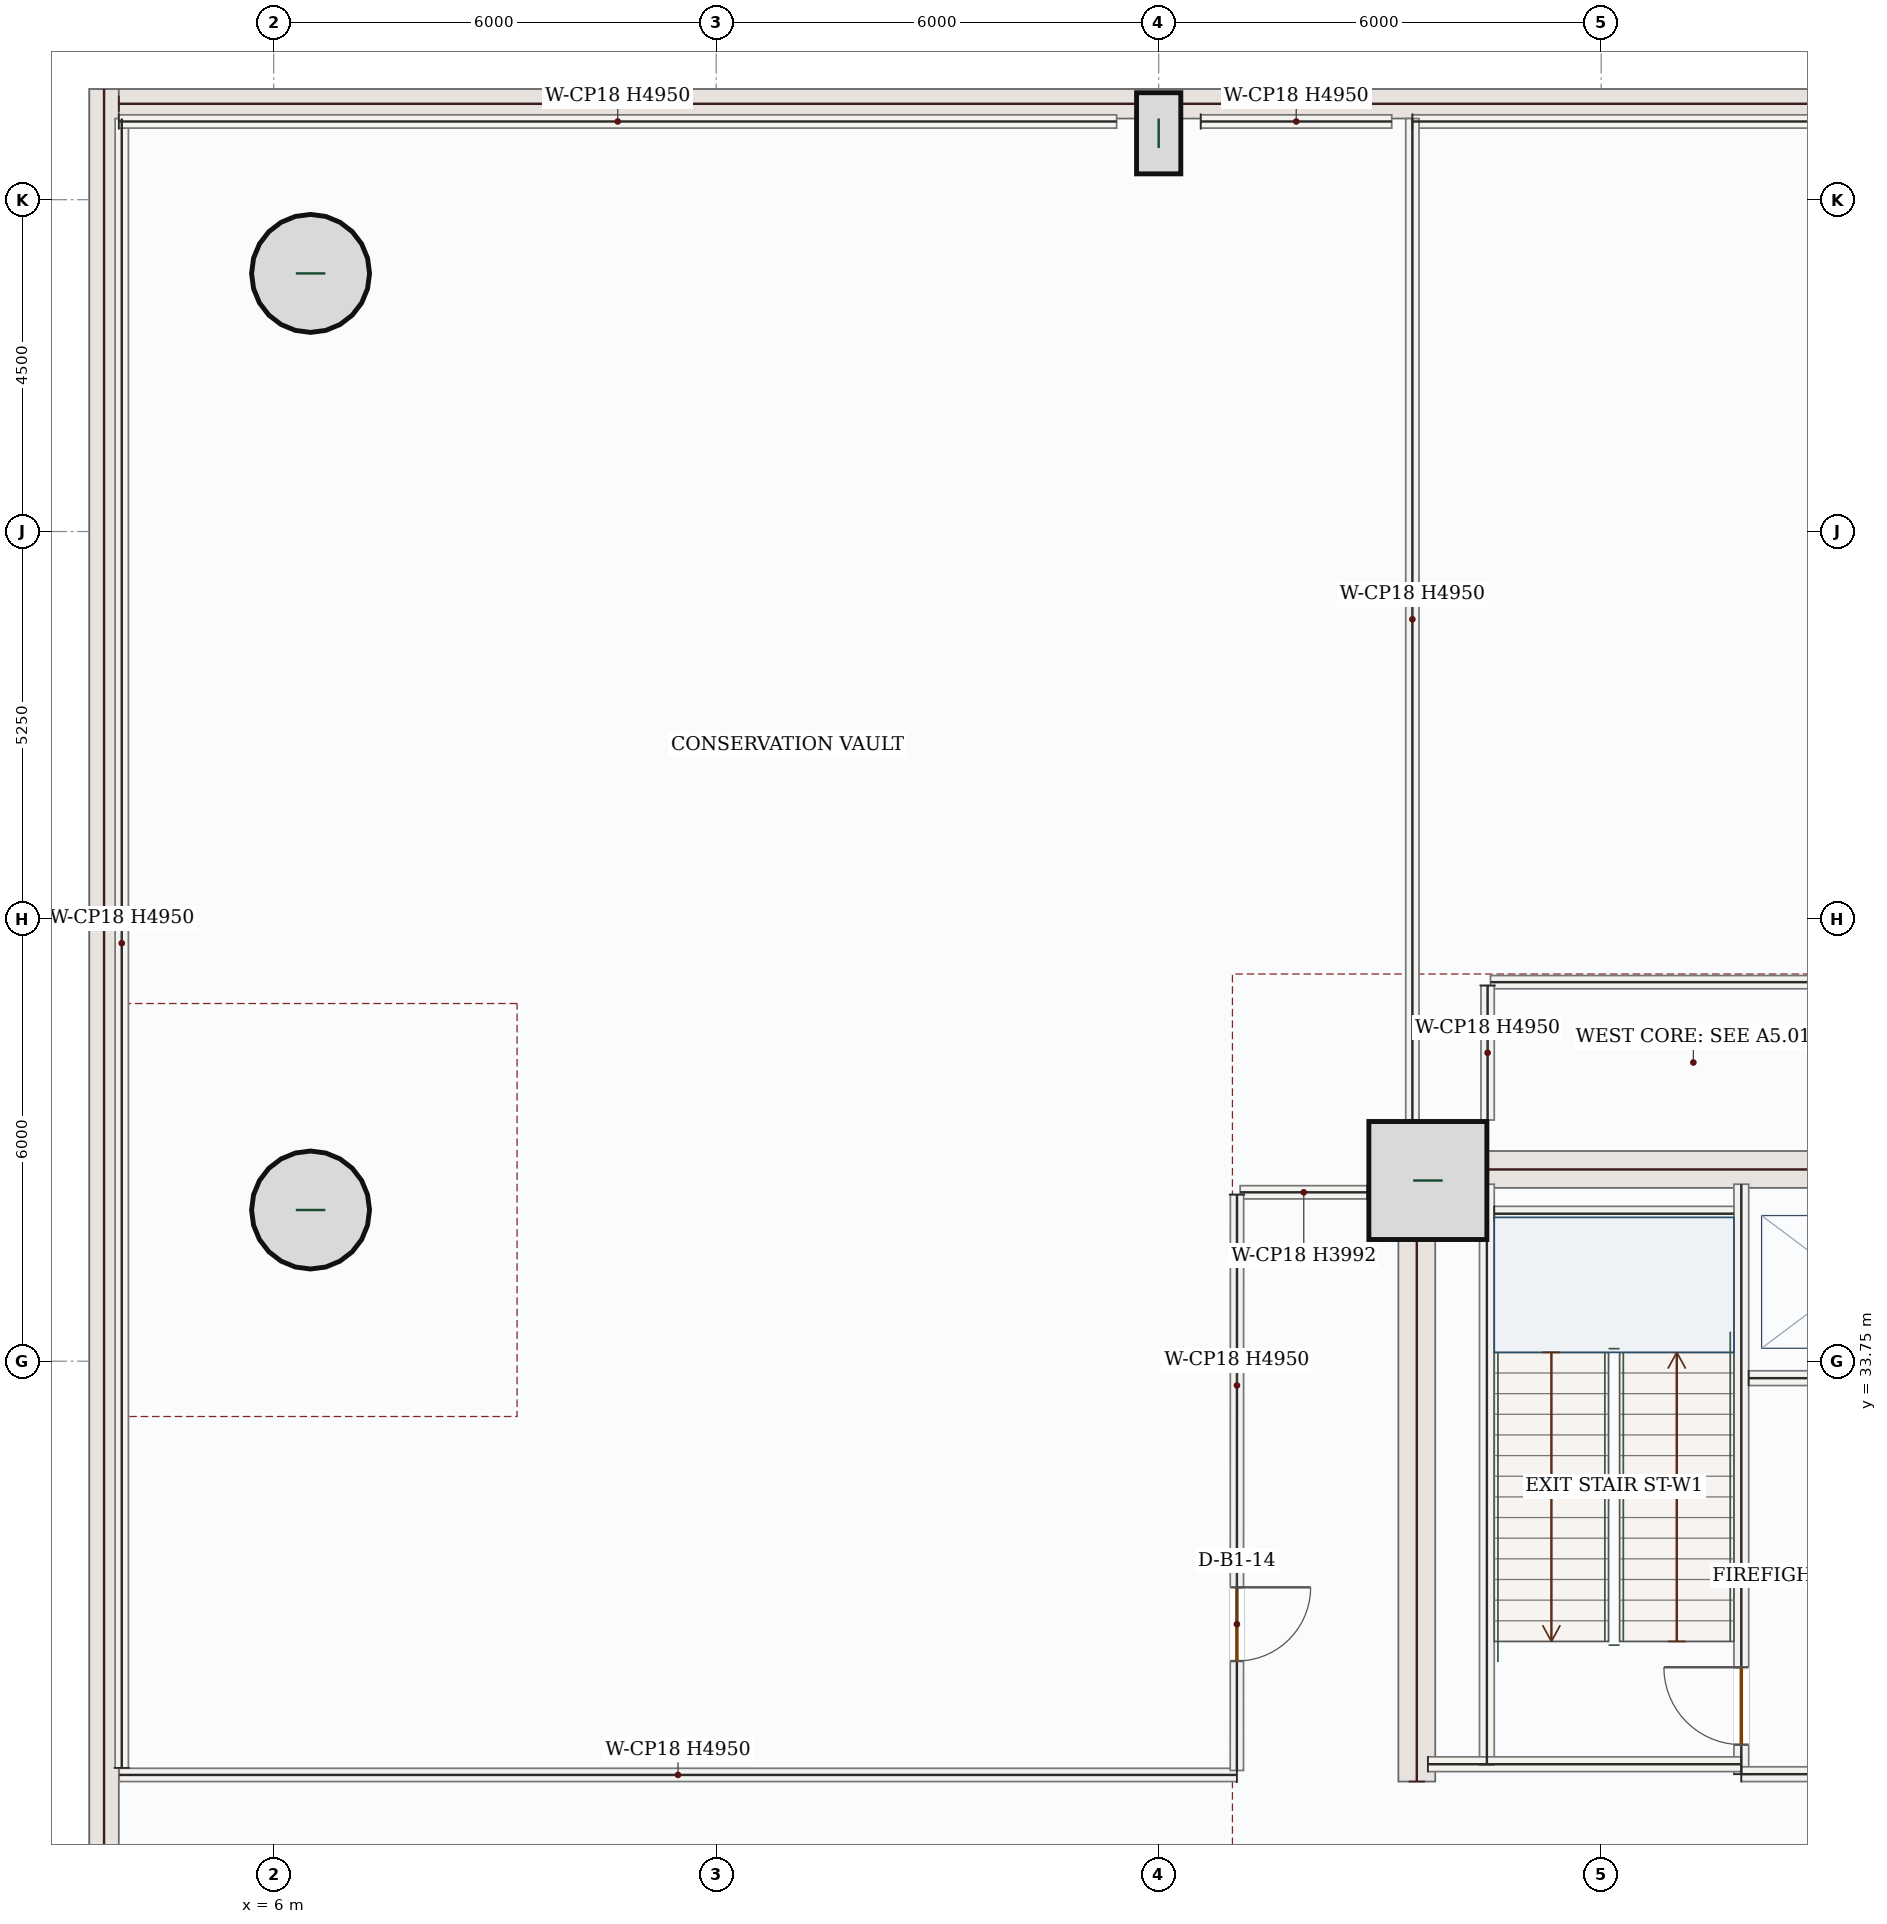
"""IFC4 building model, lengths in metres.
Left out: names, types, materials, properties, quantities, classifications, styles, units other than length and angle.
Written with IfcOpenShell. Run it as: python <this file> out.ifc"""

import sys

from ifc_helpers import new_model, si_unit, direction, frame, frame_2d, origin, origin_2d, place, context, subcontext, project, spatial, rectangle, hollow_circle, extrude, source, transform, mapped, element, fill, save


model = new_model("IFC4")
c1 = context("Model", 3, precision=1e-05, world=origin(), true_north=direction((0.0, 1.0)))
c2 = subcontext(c1, "Body", "Model", "MODEL_VIEW")
j1 = project(units=[si_unit("LENGTHUNIT", "METRE"), si_unit("PLANEANGLEUNIT", "RADIAN")], contexts=[c1])
p1 = place(None, origin())
s1 = spatial("IfcSite", under=j1, at=p1, CompositionType="ELEMENT")
p2 = place(p1, origin())
s2 = spatial("IfcBuilding", under=s1, at=p2, CompositionType="ELEMENT")
p3 = place(p2, frame((0.0, 0.0, -5.4)))
s3 = spatial("IfcBuildingStorey", under=s2, at=p3, CompositionType="ELEMENT", Elevation=-5.4)
m1 = source(origin(), c2, "Body", "SweptSolid", [
    extrude(rectangle(XDim=48.0, YDim=0.4, at=frame_2d((24.0, 0.0))), origin(), (0.0, 0.0, 1.0), 5.05),
])
p4 = place(p3, frame((3.7, 3.0, 0.0), z_axis=(0.0, 0.0, 1.0), x_axis=(0.0, 1.0, 0.0)))
e1 = element("IfcWall", 1, at=p4, inside=s3, PredefinedType="SHEAR", context=c2, shape_type="MappedRepresentation", body=[
    mapped(m1, transform((0.0, 0.0, 0.0), x_axis=(1.0, 0.0, 0.0), y_axis=(0.0, 1.0, 0.0), z_axis=(0.0, 0.0, 1.0), scale=1.0)),
])
m2 = source(origin(), c2, "Body", "SweptSolid", [
    extrude(rectangle(XDim=64.2, YDim=0.4, at=frame_2d((32.1, 0.0))), origin(), (0.0, 0.0, 1.0), 5.05),
])
p5 = place(p3, frame((3.9, 50.8, 0.0), z_axis=(0.0, 0.0, 1.0), x_axis=(1.0, 0.0, 0.0)))
e2 = element("IfcWall", 2, at=p5, inside=s3, PredefinedType="SHEAR", context=c2, shape_type="MappedRepresentation", body=[
    mapped(m2, transform((0.0, 0.0, 0.0), x_axis=(1.0, 0.0, 0.0), y_axis=(0.0, 1.0, 0.0), z_axis=(0.0, 0.0, 1.0), scale=1.0)),
])
m3 = source(origin(), c2, "Body", "SweptSolid", [
    extrude(rectangle(XDim=8.55, YDim=0.5, at=frame_2d((4.275, 0.0))), origin(), (0.0, 0.0, 1.0), 4.95),
])
p6 = place(p3, frame((21.5, 28.05, 0.0), z_axis=(0.0, 0.0, 1.0), x_axis=(0.0, 1.0, 0.0)))
e3 = element("IfcWall", 3, at=p6, inside=s3, PredefinedType="SHEAR", context=c2, shape_type="MappedRepresentation", body=[
    mapped(m3, transform((0.0, 0.0, 0.0), x_axis=(1.0, 0.0, 0.0), y_axis=(0.0, 1.0, 0.0), z_axis=(0.0, 0.0, 1.0), scale=1.0)),
])
m4 = source(origin(), c2, "Body", "SweptSolid", [
    extrude(rectangle(XDim=7.0, YDim=0.5, at=frame_2d((3.5, 0.0))), origin(), (0.0, 0.0, 1.0), 4.95),
])
p7 = place(p3, frame((21.75, 36.35, 0.0), z_axis=(0.0, 0.0, 1.0), x_axis=(1.0, 0.0, 0.0)))
e4 = element("IfcWall", 4, at=p7, inside=s3, PredefinedType="SHEAR", context=c2, shape_type="MappedRepresentation", body=[
    mapped(m4, transform((0.0, 0.0, 0.0), x_axis=(1.0, 0.0, 0.0), y_axis=(0.0, 1.0, 0.0), z_axis=(0.0, 0.0, 1.0), scale=1.0)),
])
m5 = source(origin(), c2, "Body", "SweptSolid", [
    extrude(rectangle(XDim=1.6, YDim=1.6, at=origin_2d()), origin(), (0.0, 0.0, 1.0), 5.4),
])
p8 = place(p3, frame((21.65, 36.2, 0.0), z_axis=(0.0, 0.0, 1.0), x_axis=(1.0, 0.0, 0.0)))
e5 = element("IfcColumn", 5, at=p8, inside=s3, PredefinedType="COLUMN", context=c2, shape_type="MappedRepresentation", body=[
    mapped(m5, transform((0.0, 0.0, 0.0), x_axis=(1.0, 0.0, 0.0), y_axis=(0.0, 1.0, 0.0), z_axis=(0.0, 0.0, 1.0), scale=1.0)),
])
m6 = source(origin(), c2, "Body", "SweptSolid", [
    extrude(hollow_circle(Radius=0.8, WallThickness=0.06, at=origin_2d()), origin(), (0.0, 0.0, 1.0), 5.4),
])
for number, where, z_axis, x_axis in (
    (6, (6.5, 35.8, 0.0), (0.0, 0.0, 1.0), (1.0, 0.0, 0.0)),
    (7, (6.5, 48.5, 0.0), (0.0, 0.0, 1.0), (1.0, 0.0, 0.0)),
):
    element("IfcColumn", number, at=place(p3, frame(where, z_axis=z_axis, x_axis=x_axis)), inside=s3, PredefinedType="COLUMN", context=c2, shape_type="MappedRepresentation", body=[
        mapped(m6, transform((0.0, 0.0, 0.0), x_axis=(1.0, 0.0, 0.0), y_axis=(0.0, 1.0, 0.0), z_axis=(0.0, 0.0, 1.0), scale=1.0)),
    ])
m7 = source(origin(), c2, "Body", "SweptSolid", [
    extrude(rectangle(XDim=0.6, YDim=1.1, at=origin_2d()), origin(), (0.0, 0.0, 1.0), 5.4),
])
p9 = place(p3, frame((18.0, 50.4, 0.0), z_axis=(0.0, 0.0, 1.0), x_axis=(1.0, 0.0, 0.0)))
e8 = element("IfcColumn", 8, at=p9, inside=s3, PredefinedType="PILASTER", context=c2, shape_type="MappedRepresentation", body=[
    mapped(m7, transform((0.0, 0.0, 0.0), x_axis=(1.0, 0.0, 0.0), y_axis=(0.0, 1.0, 0.0), z_axis=(0.0, 0.0, 1.0), scale=1.0)),
])
m8 = source(origin(), c2, "Body", "SweptSolid", [
    extrude(rectangle(XDim=7.87, YDim=0.2, at=frame_2d((3.935, 0.0))), origin(), (0.0, 0.0, 1.0), 4.95),
])
p10 = place(p3, frame((22.45, 28.28, 0.0), z_axis=(0.0, 0.0, 1.0), x_axis=(0.0, 1.0, 0.0)))
e9 = element("IfcWall", 9, at=p10, inside=s3, PredefinedType="SOLIDWALL", context=c2, shape_type="MappedRepresentation", body=[
    mapped(m8, transform((0.0, 0.0, 0.0), x_axis=(1.0, 0.0, 0.0), y_axis=(0.0, 1.0, 0.0), z_axis=(0.0, 0.0, 1.0), scale=1.0)),
])
p11 = place(p3, frame((25.9, 28.15, 0.0), z_axis=(0.0, 0.0, 1.0), x_axis=(0.0, 1.0, 0.0)))
e10 = element("IfcWall", 10, at=p11, inside=s3, PredefinedType="SOLIDWALL", context=c2, shape_type="SweptSolid", body=[
    extrude(rectangle(XDim=8.0, YDim=0.2, at=frame_2d((4.0, 0.0))), origin(), (0.0, 0.0, 1.0), 4.95),
])
p12 = place(p11, frame((0.4, 0.0, 0.0)))
e11 = element("IfcOpeningElement", 11, at=p12, cuts=e10, PredefinedType="OPENING", context=c2, shape_type="SweptSolid", body=[
    extrude(rectangle(XDim=1.05, YDim=2.15, at=frame_2d((0.525, 1.075))), frame((0.0, 0.11, 0.0), z_axis=(0.0, -1.0, 0.0), x_axis=(1.0, 0.0, 0.0)), (0.0, 0.0, 1.0), 0.22),
])
m9 = source(origin(), c2, "Body", "SweptSolid", [
    extrude(rectangle(XDim=4.25, YDim=0.2, at=frame_2d((2.125, 0.0))), origin(), (0.0, 0.0, 1.0), 4.95),
])
p13 = place(p3, frame((21.65, 28.285, 0.0), z_axis=(0.0, 0.0, 1.0), x_axis=(1.0, 0.0, 0.0)))
e12 = element("IfcWall", 12, at=p13, inside=s3, PredefinedType="SOLIDWALL", context=c2, shape_type="MappedRepresentation", body=[
    mapped(m9, transform((0.0, 0.0, 0.0), x_axis=(1.0, 0.0, 0.0), y_axis=(0.0, 1.0, 0.0), z_axis=(0.0, 0.0, 1.0), scale=1.0)),
])
m10 = source(origin(), c2, "Body", "SweptSolid", [
    extrude(rectangle(XDim=3.0, YDim=0.2, at=frame_2d((1.5, 0.0))), origin(), (0.0, 0.0, 1.0), 4.95),
])
p14 = place(p3, frame((25.9, 28.15, 0.0), z_axis=(0.0, 0.0, 1.0), x_axis=(1.0, 0.0, 0.0)))
e13 = element("IfcWall", 13, at=p14, inside=s3, PredefinedType="SOLIDWALL", context=c2, shape_type="MappedRepresentation", body=[
    mapped(m10, transform((0.0, 0.0, 0.0), x_axis=(1.0, 0.0, 0.0), y_axis=(0.0, 1.0, 0.0), z_axis=(0.0, 0.0, 1.0), scale=1.0)),
])
m11 = source(origin(), c2, "Body", "SweptSolid", [
    extrude(rectangle(XDim=3.25, YDim=0.2, at=frame_2d((1.625, 0.0))), origin(), (0.0, 0.0, 1.0), 4.95),
])
p15 = place(p3, frame((22.55, 35.75, 0.0), z_axis=(0.0, 0.0, 1.0), x_axis=(1.0, 0.0, 0.0)))
e14 = element("IfcWall", 14, at=p15, inside=s3, PredefinedType="SOLIDWALL", context=c2, shape_type="MappedRepresentation", body=[
    mapped(m11, transform((0.0, 0.0, 0.0), x_axis=(1.0, 0.0, 0.0), y_axis=(0.0, 1.0, 0.0), z_axis=(0.0, 0.0, 1.0), scale=1.0)),
])
p16 = place(p3, frame((26.0, 33.52, 0.0), z_axis=(0.0, 0.0, 1.0), x_axis=(1.0, 0.0, 0.0)))
e15 = element("IfcWall", 15, at=p16, inside=s3, PredefinedType="SOLIDWALL", context=c2, shape_type="SweptSolid", body=[
    extrude(rectangle(XDim=2.75, YDim=0.2, at=frame_2d((1.375, 0.0))), origin(), (0.0, 0.0, 1.0), 4.95),
])
p17 = place(p16, frame((0.82, 0.0, 0.0)))
e16 = element("IfcOpeningElement", 16, at=p17, cuts=e15, PredefinedType="OPENING", context=c2, shape_type="SweptSolid", body=[
    extrude(rectangle(XDim=1.1, YDim=2.15, at=frame_2d((0.55, 1.075))), frame((0.0, 0.11, 0.0), z_axis=(0.0, -1.0, 0.0), x_axis=(1.0, 0.0, 0.0)), (0.0, 0.0, 1.0), 0.22),
])
m12 = source(origin(), c2, "Body", "SweptSolid", [
    extrude(rectangle(XDim=29.12, YDim=0.18, at=frame_2d((14.56, 0.0))), origin(), (0.0, 0.0, 1.0), 4.95),
])
p18 = place(p3, frame((21.44, 50.56, 0.0), z_axis=(0.0, 0.0, 1.0), x_axis=(1.0, 0.0, 0.0)))
e17 = element("IfcWall", 17, at=p18, inside=s3, PredefinedType="PARTITIONING", context=c2, shape_type="MappedRepresentation", body=[
    mapped(m12, transform((0.0, 0.0, 0.0), x_axis=(1.0, 0.0, 0.0), y_axis=(0.0, 1.0, 0.0), z_axis=(0.0, 0.0, 1.0), scale=1.0)),
])
p19 = place(p3, frame((49.494, 38.89, 0.0), z_axis=(0.0, 0.0, 1.0), x_axis=(-0.999999999836, -1.8087762e-05, 0.0)))
e18 = element("IfcWall", 18, at=p19, inside=s3, PredefinedType="PARTITIONING", context=c2, shape_type="SweptSolid", body=[
    extrude(rectangle(XDim=26.995, YDim=0.18, at=frame_2d((13.498, 0.0))), origin(), (0.0, 0.0, 1.0), 4.95),
])
p20 = place(p19, frame((12.998, 0.0, 0.0)))
e19 = element("IfcOpeningElement", 19, at=p20, cuts=e18, PredefinedType="OPENING", context=c2, shape_type="SweptSolid", body=[
    extrude(rectangle(XDim=1.0, YDim=2.15, at=frame_2d((0.5, 1.075))), frame((0.0, 0.1, 0.0), z_axis=(0.0, -1.0, 0.0), x_axis=(1.0, 0.0, 0.0)), (0.0, 0.0, 1.0), 0.2),
])
m13 = source(origin(), c2, "Body", "SweptSolid", [
    extrude(rectangle(XDim=1.824, YDim=0.18, at=frame_2d((0.912, 0.0))), origin(), (0.0, 0.0, 1.0), 4.95),
])
p21 = place(p3, frame((22.46, 38.844, 0.0), z_axis=(0.0, 0.0, 1.0), x_axis=(0.0, -1.0, 0.0)))
e20 = element("IfcWall", 20, at=p21, inside=s3, PredefinedType="PARTITIONING", context=c2, shape_type="MappedRepresentation", body=[
    mapped(m13, transform((0.0, 0.0, 0.0), x_axis=(1.0, 0.0, 0.0), y_axis=(0.0, 1.0, 0.0), z_axis=(0.0, 0.0, 1.0), scale=1.0)),
])
m14 = source(origin(), c2, "Body", "SweptSolid", [
    extrude(rectangle(XDim=13.58, YDim=0.18, at=frame_2d((6.79, 0.0))), origin(), (0.0, 0.0, 1.0), 4.95),
])
p22 = place(p3, frame((21.44, 37.02, 0.0), z_axis=(0.0, 0.0, 1.0), x_axis=(0.0, 1.0, 0.0)))
e21 = element("IfcWall", 21, at=p22, inside=s3, PredefinedType="PARTITIONING", context=c2, shape_type="MappedRepresentation", body=[
    mapped(m14, transform((0.0, 0.0, 0.0), x_axis=(1.0, 0.0, 0.0), y_axis=(0.0, 1.0, 0.0), z_axis=(0.0, 0.0, 1.0), scale=1.0)),
])
m15 = source(origin(), c2, "Body", "SweptSolid", [
    extrude(rectangle(XDim=15.155, YDim=0.18, at=frame_2d((7.578, 0.0))), origin(), (0.0, 0.0, 1.0), 4.95),
])
p23 = place(p3, frame((19.06, 28.14, 0.0), z_axis=(0.0, 0.0, 1.0), x_axis=(-1.0, 0.0, 0.0)))
e22 = element("IfcWall", 22, at=p23, inside=s3, PredefinedType="PARTITIONING", context=c2, shape_type="MappedRepresentation", body=[
    mapped(m15, transform((0.0, 0.0, 0.0), x_axis=(1.0, 0.0, 0.0), y_axis=(0.0, 1.0, 0.0), z_axis=(0.0, 0.0, 1.0), scale=1.0)),
])
m16 = source(origin(), c2, "Body", "SweptSolid", [
    extrude(rectangle(XDim=22.365, YDim=0.18, at=frame_2d((11.183, 0.0))), origin(), (0.0, 0.0, 1.0), 4.95),
])
p24 = place(p3, frame((3.94, 28.235, 0.0), z_axis=(0.0, 0.0, 1.0), x_axis=(0.0, 1.0, 0.0)))
e23 = element("IfcWall", 23, at=p24, inside=s3, PredefinedType="PARTITIONING", context=c2, shape_type="MappedRepresentation", body=[
    mapped(m16, transform((0.0, 0.0, 0.0), x_axis=(1.0, 0.0, 0.0), y_axis=(0.0, 1.0, 0.0), z_axis=(0.0, 0.0, 1.0), scale=1.0)),
])
m17 = source(origin(), c2, "Body", "SweptSolid", [
    extrude(rectangle(XDim=13.53, YDim=0.18, at=frame_2d((6.765, 0.0))), origin(), (0.0, 0.0, 1.0), 4.95),
])
p25 = place(p3, frame((3.9, 50.56, 0.0), z_axis=(0.0, 0.0, 1.0), x_axis=(1.0, 0.0, 0.0)))
e24 = element("IfcWall", 24, at=p25, inside=s3, PredefinedType="PARTITIONING", context=c2, shape_type="MappedRepresentation", body=[
    mapped(m17, transform((0.0, 0.0, 0.0), x_axis=(1.0, 0.0, 0.0), y_axis=(0.0, 1.0, 0.0), z_axis=(0.0, 0.0, 1.0), scale=1.0)),
])
m18 = source(origin(), c2, "Body", "SweptSolid", [
    extrude(rectangle(XDim=2.59, YDim=0.18, at=frame_2d((1.295, 0.0))), origin(), (0.0, 0.0, 1.0), 4.95),
])
p26 = place(p3, frame((18.57, 50.56, 0.0), z_axis=(0.0, 0.0, 1.0), x_axis=(1.0, 0.0, 0.0)))
e25 = element("IfcWall", 25, at=p26, inside=s3, PredefinedType="PARTITIONING", context=c2, shape_type="MappedRepresentation", body=[
    mapped(m18, transform((0.0, 0.0, 0.0), x_axis=(1.0, 0.0, 0.0), y_axis=(0.0, 1.0, 0.0), z_axis=(0.0, 0.0, 1.0), scale=1.0)),
])
m19 = source(origin(), c2, "Body", "SweptSolid", [
    extrude(rectangle(XDim=1.726, YDim=0.18, at=frame_2d((0.863, 0.0))), origin(), (0.0, 0.0, 1.0), 3.992),
])
p27 = place(p3, frame((20.83, 36.04, 0.0), z_axis=(0.0, 0.0, 1.0), x_axis=(-1.0, 0.0, 0.0)))
e26 = element("IfcWall", 26, at=p27, inside=s3, PredefinedType="PARTITIONING", context=c2, shape_type="MappedRepresentation", body=[
    mapped(m19, transform((0.0, 0.0, 0.0), x_axis=(1.0, 0.0, 0.0), y_axis=(0.0, 1.0, 0.0), z_axis=(0.0, 0.0, 1.0), scale=1.0)),
])
p28 = place(p3, frame((19.062, 36.009, 0.0), z_axis=(0.0, 0.0, 1.0), x_axis=(-0.000250109415, -0.999999968723, 0.0)))
e27 = element("IfcWall", 27, at=p28, inside=s3, PredefinedType="PARTITIONING", context=c2, shape_type="SweptSolid", body=[
    extrude(rectangle(XDim=7.809, YDim=0.18, at=frame_2d((3.905, 0.0))), origin(), (0.0, 0.0, 1.0), 4.95),
])
p29 = place(p28, frame((5.325, 0.0, 0.0)))
e28 = element("IfcOpeningElement", 28, at=p29, cuts=e27, PredefinedType="OPENING", context=c2, shape_type="SweptSolid", body=[
    extrude(rectangle(XDim=1.0, YDim=2.15, at=frame_2d((0.5, 1.075))), frame((0.0, 0.1, 0.0), z_axis=(0.0, -1.0, 0.0), x_axis=(1.0, 0.0, 0.0)), (0.0, 0.0, 1.0), 0.2),
])
m20 = source(origin(), c2, "Body", "SweptSolid", [
    extrude(rectangle(XDim=1.05, YDim=2.15, at=frame_2d((0.525, 1.075))), frame((0.0, 0.025, 0.0), z_axis=(0.0, -1.0, 0.0), x_axis=(1.0, 0.0, 0.0)), (0.0, 0.0, 1.0), 0.05),
])
p30 = place(p12, origin())
e29 = element("IfcDoor", 29, at=p30, inside=s3, OperationType="SINGLE_SWING_RIGHT", PredefinedType="DOOR", context=c2, shape_type="MappedRepresentation", body=[
    mapped(m20, transform((0.0, 0.0, 0.0), x_axis=(1.0, 0.0, 0.0), y_axis=(0.0, 1.0, 0.0), z_axis=(0.0, 0.0, 1.0), scale=1.0)),
])
fill(e11, e29)
m21 = source(origin(), c2, "Body", "SweptSolid", [
    extrude(rectangle(XDim=1.0, YDim=2.15, at=frame_2d((0.5, 1.075))), frame((0.0, 0.025, 0.0), z_axis=(0.0, -1.0, 0.0), x_axis=(1.0, 0.0, 0.0)), (0.0, 0.0, 1.0), 0.05),
])
p31 = place(p29, origin())
e30 = element("IfcDoor", 30, at=p31, inside=s3, OperationType="SINGLE_SWING_LEFT", PredefinedType="DOOR", context=c2, shape_type="MappedRepresentation", body=[
    mapped(m21, transform((0.0, 0.0, 0.0), x_axis=(1.0, 0.0, 0.0), y_axis=(0.0, 1.0, 0.0), z_axis=(0.0, 0.0, 1.0), scale=1.0)),
])
fill(e28, e30)
save(model, sys.argv[1])
